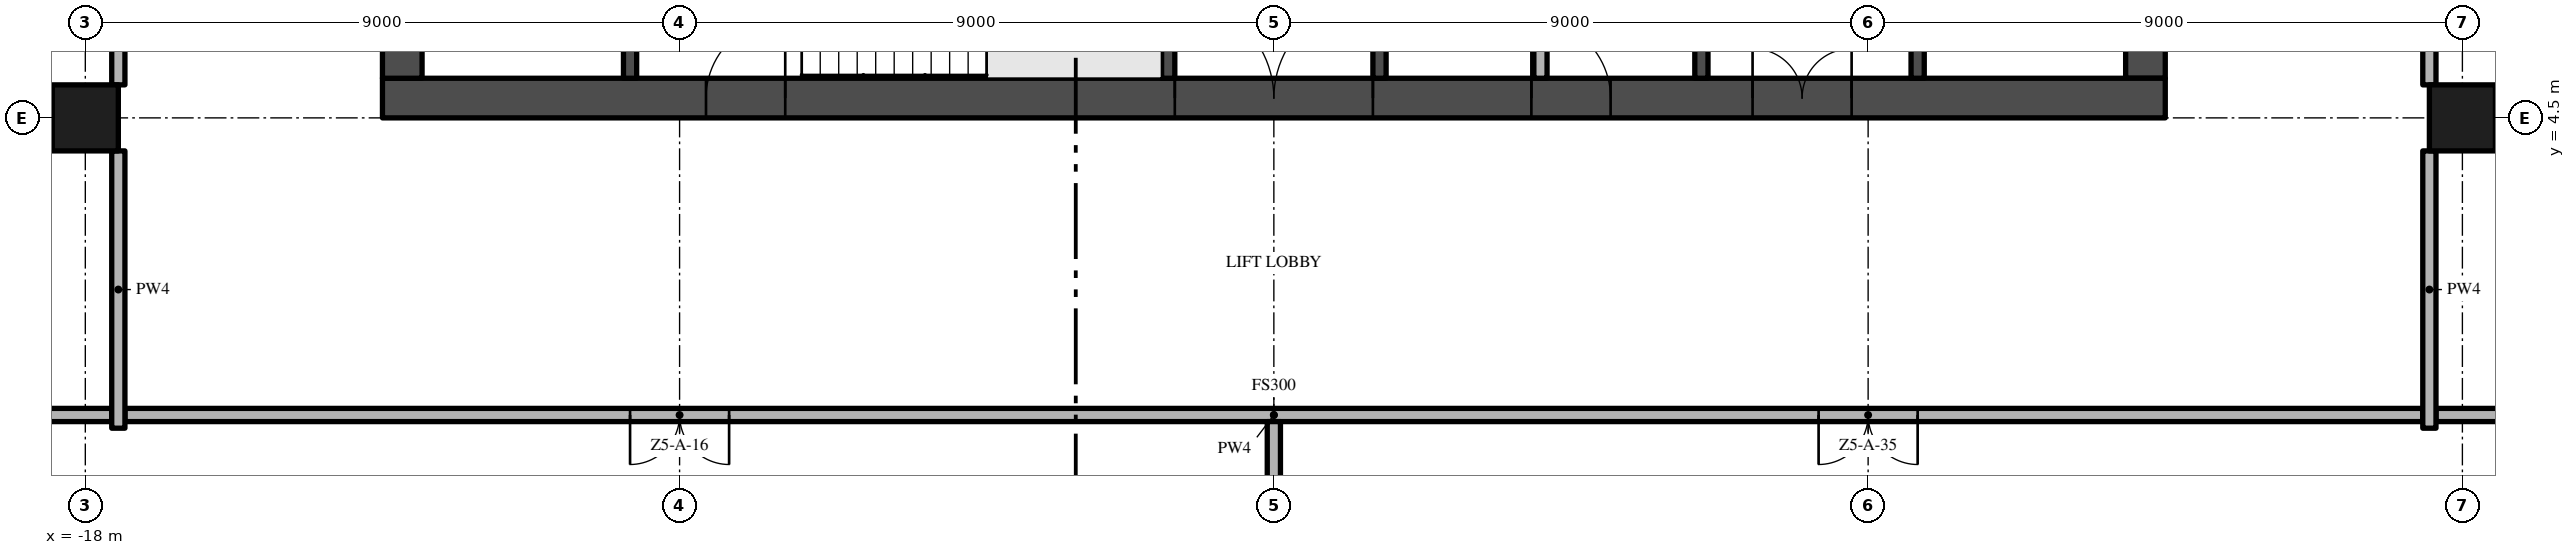
"""IFC4 building model, lengths in metres.
Left out: names, types, materials, properties, quantities, classifications, styles, units other than length and angle.
Written with IfcOpenShell. Run it as: python <this file> out.ifc"""

import sys

from ifc_helpers import new_model, si_unit, direction, frame, frame_2d, origin, origin_2d, place, context, subcontext, project, spatial, rectangle, extrude, element, fill, save


model = new_model("IFC4")
c1 = context("Model", 3, precision=1e-05, world=origin(), true_north=direction((0.0, 1.0)))
c2 = subcontext(c1, "Body", "Model", "MODEL_VIEW")
j1 = project(units=[si_unit("LENGTHUNIT", "METRE"), si_unit("PLANEANGLEUNIT", "RADIAN")], contexts=[c1])
p1 = place(None, origin())
s1 = spatial("IfcSite", under=j1, at=p1, CompositionType="ELEMENT")
p2 = place(p1, origin())
s2 = spatial("IfcBuilding", under=s1, at=p2, CompositionType="ELEMENT")
p3 = place(p2, frame((0.0, 0.0, 246.4)))
s3 = spatial("IfcBuildingStorey", under=s2, at=p3, CompositionType="ELEMENT", Elevation=246.4)
p4 = place(p3, frame((-13.5, 4.8, -0.3), z_axis=(0.0, 0.0, 1.0), x_axis=(1.0, 0.0, 0.0)))
e1 = element("IfcWall", 1, at=p4, inside=s3, PredefinedType="SHEAR", context=c2, shape_type="SweptSolid", body=[
    extrude(rectangle(XDim=27.0, YDim=0.6, at=frame_2d((13.5, 0.0))), origin(), (0.0, 0.0, 1.0), 3.8),
])
p5 = place(p4, frame((12.0, 0.0, 0.3)))
e2 = element("IfcOpeningElement", 2, at=p5, cuts=e1, PredefinedType="OPENING", context=c2, shape_type="SweptSolid", body=[
    extrude(rectangle(XDim=3.0, YDim=2.4, at=frame_2d((1.5, 1.2))), frame((0.0, 0.31, 0.0), z_axis=(0.0, -1.0, 0.0), x_axis=(1.0, 0.0, 0.0)), (0.0, 0.0, 1.0), 0.62),
])
p6 = place(p4, frame((4.9, 0.0, 0.3)))
e3 = element("IfcOpeningElement", 3, at=p6, cuts=e1, PredefinedType="OPENING", context=c2, shape_type="SweptSolid", body=[
    extrude(rectangle(XDim=1.2, YDim=2.2, at=frame_2d((0.6, 1.1))), frame((0.0, 0.31, 0.0), z_axis=(0.0, -1.0, 0.0), x_axis=(1.0, 0.0, 0.0)), (0.0, 0.0, 1.0), 0.62),
])
p7 = place(p4, frame((20.75, 0.0, 0.3)))
e4 = element("IfcOpeningElement", 4, at=p7, cuts=e1, PredefinedType="OPENING", context=c2, shape_type="SweptSolid", body=[
    extrude(rectangle(XDim=1.5, YDim=2.2, at=frame_2d((0.75, 1.1))), frame((0.0, 0.31, 0.0), z_axis=(0.0, -1.0, 0.0), x_axis=(1.0, 0.0, 0.0)), (0.0, 0.0, 1.0), 0.62),
])
p8 = place(p4, frame((17.4, 0.0, 0.3)))
e5 = element("IfcOpeningElement", 5, at=p8, cuts=e1, PredefinedType="OPENING", context=c2, shape_type="SweptSolid", body=[
    extrude(rectangle(XDim=1.2, YDim=2.2, at=frame_2d((0.6, 1.1))), frame((0.0, 0.31, 0.0), z_axis=(0.0, -1.0, 0.0), x_axis=(1.0, 0.0, 0.0)), (0.0, 0.0, 1.0), 0.62),
])
p9 = place(p3, frame((13.2, 5.1, -0.3), z_axis=(0.0, 0.0, 1.0), x_axis=(0.0, 1.0, 0.0)))
e6 = element("IfcWall", 6, at=p9, inside=s3, PredefinedType="SHEAR", context=c2, shape_type="SweptSolid", body=[
    extrude(rectangle(XDim=16.8, YDim=0.6, at=frame_2d((8.4, 0.0))), origin(), (0.0, 0.0, 1.0), 3.8),
])
p10 = place(p9, frame((6.3, 0.0, 0.3)))
e7 = element("IfcOpeningElement", 7, at=p10, cuts=e6, PredefinedType="OPENING", context=c2, shape_type="SweptSolid", body=[
    extrude(rectangle(XDim=1.2, YDim=2.2, at=frame_2d((0.6, 1.1))), frame((0.0, 0.31, 0.0), z_axis=(0.0, -1.0, 0.0), x_axis=(1.0, 0.0, 0.0)), (0.0, 0.0, 1.0), 0.62),
])
p11 = place(p3, frame((-13.2, 21.9, -0.3), z_axis=(0.0, 0.0, 1.0), x_axis=(0.0, -1.0, 0.0)))
e8 = element("IfcWall", 8, at=p11, inside=s3, PredefinedType="SHEAR", context=c2, shape_type="SweptSolid", body=[
    extrude(rectangle(XDim=16.8, YDim=0.6, at=frame_2d((8.4, 0.0))), origin(), (0.0, 0.0, 1.0), 3.8),
])
p12 = place(p11, frame((9.3, 0.0, 0.3)))
e9 = element("IfcOpeningElement", 9, at=p12, cuts=e8, PredefinedType="OPENING", context=c2, shape_type="SweptSolid", body=[
    extrude(rectangle(XDim=1.2, YDim=2.2, at=frame_2d((0.6, 1.1))), frame((0.0, 0.31, 0.0), z_axis=(0.0, -1.0, 0.0), x_axis=(1.0, 0.0, 0.0)), (0.0, 0.0, 1.0), 0.62),
])
for number, where, z_axis, x_axis in (
    (10, (-18.0, 4.5, 0.0), (0.0, 0.0, 1.0), (1.0, 0.0, 0.0)),
    (11, (18.0, 4.5, 0.0), (0.0, 0.0, 1.0), (1.0, 0.0, 0.0)),
):
    element("IfcColumn", number, at=place(p3, frame(where, z_axis=z_axis, x_axis=x_axis)), inside=s3, PredefinedType="COLUMN", context=c2, shape_type="SweptSolid", body=[
        extrude(rectangle(XDim=1.0, YDim=1.0, at=origin_2d()), origin(), (0.0, 0.0, 1.0), 3.5),
    ])
for number, where, z_axis, x_axis in (
    (12, (-9.75, 5.1, 0.0), (0.0, 0.0, 1.0), (0.0, 1.0, 0.0)),
    (13, (-1.6, 5.1, 0.0), (0.0, 0.0, 1.0), (0.0, 1.0, 0.0)),
):
    element("IfcWall", number, at=place(p3, frame(where, z_axis=z_axis, x_axis=x_axis)), inside=s3, PredefinedType="SHEAR", context=c2, shape_type="SweptSolid", body=[
        extrude(rectangle(XDim=2.85, YDim=0.2, at=frame_2d((1.425, 0.0))), origin(), (0.0, 0.0, 1.0), 3.5),
    ])
p13 = place(p3, frame((1.6, 9.8, 0.0), z_axis=(0.0, 0.0, 1.0), x_axis=(0.0, -1.0, 0.0)))
e14 = element("IfcWall", 14, at=p13, inside=s3, PredefinedType="SHEAR", context=c2, shape_type="SweptSolid", body=[
    extrude(rectangle(XDim=4.7, YDim=0.2, at=frame_2d((2.35, 0.0))), origin(), (0.0, 0.0, 1.0), 3.5),
])
p14 = place(p13, frame((1.5, 0.0, 0.0)))
e15 = element("IfcOpeningElement", 15, at=p14, cuts=e14, PredefinedType="OPENING", context=c2, shape_type="SweptSolid", body=[
    extrude(rectangle(XDim=0.9, YDim=2.1, at=frame_2d((0.45, 1.05))), frame((0.0, 0.11, 0.0), z_axis=(0.0, -1.0, 0.0), x_axis=(1.0, 0.0, 0.0)), (0.0, 0.0, 1.0), 0.22),
])
p15 = place(p3, frame((4.037, 9.8, 0.0), z_axis=(0.0, 0.0, 1.0), x_axis=(0.0, -1.0, 0.0)))
e16 = element("IfcWall", 16, at=p15, inside=s3, PredefinedType="PARTITIONING", context=c2, shape_type="SweptSolid", body=[
    extrude(rectangle(XDim=4.7, YDim=0.2, at=frame_2d((2.35, 0.0))), origin(), (0.0, 0.0, 1.0), 3.5),
])
p16 = place(p15, frame((1.9, 0.0, 0.0)))
e17 = element("IfcOpeningElement", 17, at=p16, cuts=e16, PredefinedType="OPENING", context=c2, shape_type="SweptSolid", body=[
    extrude(rectangle(XDim=0.9, YDim=2.1, at=frame_2d((0.45, 1.05))), frame((0.0, 0.11, 0.0), z_axis=(0.0, -1.0, 0.0), x_axis=(1.0, 0.0, 0.0)), (0.0, 0.0, 1.0), 0.22),
])
p17 = place(p3, frame((6.475, 5.1, 0.0), z_axis=(0.0, 0.0, 1.0), x_axis=(0.0, 1.0, 0.0)))
e18 = element("IfcWall", 18, at=p17, inside=s3, PredefinedType="SHEAR", context=c2, shape_type="SweptSolid", body=[
    extrude(rectangle(XDim=4.7, YDim=0.2, at=frame_2d((2.35, 0.0))), origin(), (0.0, 0.0, 1.0), 3.5),
])
p18 = place(p3, frame((9.75, 5.1, 0.0), z_axis=(0.0, 0.0, 1.0), x_axis=(0.0, 1.0, 0.0)))
e19 = element("IfcWall", 19, at=p18, inside=s3, PredefinedType="SHEAR", context=c2, shape_type="SweptSolid", body=[
    extrude(rectangle(XDim=2.5, YDim=0.2, at=frame_2d((1.25, 0.0))), origin(), (0.0, 0.0, 1.0), 3.5),
])
p19 = place(p18, frame((0.85, 0.0, 0.0)))
e20 = element("IfcOpeningElement", 20, at=p19, cuts=e19, PredefinedType="OPENING", context=c2, shape_type="SweptSolid", body=[
    extrude(rectangle(XDim=1.1, YDim=2.1, at=frame_2d((0.55, 1.05))), frame((0.0, 0.11, 0.0), z_axis=(0.0, -1.0, 0.0), x_axis=(1.0, 0.0, 0.0)), (0.0, 0.0, 1.0), 0.22),
])
p20 = place(p3, frame((17.4, 0.0, 0.0), z_axis=(0.0, 0.0, 1.0), x_axis=(-1.0, 0.0, 0.0)))
e21 = element("IfcWall", 21, at=p20, inside=s3, PredefinedType="PARTITIONING", context=c2, shape_type="SweptSolid", body=[
    extrude(rectangle(XDim=34.8, YDim=0.2, at=frame_2d((17.4, 0.0))), origin(), (0.0, 0.0, 1.0), 3.5),
])
p21 = place(p20, frame((25.65, 0.0, 0.0)))
e22 = element("IfcOpeningElement", 22, at=p21, cuts=e21, PredefinedType="OPENING", context=c2, shape_type="SweptSolid", body=[
    extrude(rectangle(XDim=1.5, YDim=2.4, at=frame_2d((0.75, 1.2))), frame((0.0, 0.11, 0.0), z_axis=(0.0, -1.0, 0.0), x_axis=(1.0, 0.0, 0.0)), (0.0, 0.0, 1.0), 0.22),
])
p22 = place(p20, frame((7.65, 0.0, 0.0)))
e23 = element("IfcOpeningElement", 23, at=p22, cuts=e21, PredefinedType="OPENING", context=c2, shape_type="SweptSolid", body=[
    extrude(rectangle(XDim=1.5, YDim=2.4, at=frame_2d((0.75, 1.2))), frame((0.0, 0.11, 0.0), z_axis=(0.0, -1.0, 0.0), x_axis=(1.0, 0.0, 0.0)), (0.0, 0.0, 1.0), 0.22),
])
for number, where, z_axis, x_axis in (
    (24, (-26.7, 0.0, 0.0), (0.0, 0.0, 1.0), (1.0, 0.0, 0.0)),
    (25, (17.6, 0.0, 0.0), (0.0, 0.0, 1.0), (1.0, 0.0, 0.0)),
):
    element("IfcWall", number, at=place(p3, frame(where, z_axis=z_axis, x_axis=x_axis)), inside=s3, PredefinedType="PARTITIONING", context=c2, shape_type="SweptSolid", body=[
        extrude(rectangle(XDim=9.1, YDim=0.2, at=frame_2d((4.55, 0.0))), origin(), (0.0, 0.0, 1.0), 3.5),
    ])
p23 = place(p3, frame((-17.5, -0.2, 0.0), z_axis=(0.0, 0.0, 1.0), x_axis=(0.0, 1.0, 0.0)))
e26 = element("IfcWall", 26, at=p23, inside=s3, PredefinedType="PARTITIONING", context=c2, shape_type="SweptSolid", body=[
    extrude(rectangle(XDim=4.2, YDim=0.2, at=frame_2d((2.1, 0.0))), origin(), (0.0, 0.0, 1.0), 3.5),
])
p24 = place(p3, frame((-17.5, 5.0, 0.0), z_axis=(0.0, 0.0, 1.0), x_axis=(0.0, 1.0, 0.0)))
e27 = element("IfcWall", 27, at=p24, inside=s3, PredefinedType="PARTITIONING", context=c2, shape_type="SweptSolid", body=[
    extrude(rectangle(XDim=8.0, YDim=0.2, at=frame_2d((4.0, 0.0))), origin(), (0.0, 0.0, 1.0), 3.5),
])
p25 = place(p3, frame((0.0, -4.0, 0.0), z_axis=(0.0, 0.0, 1.0), x_axis=(0.0, 1.0, 0.0)))
e28 = element("IfcWall", 28, at=p25, inside=s3, PredefinedType="PARTITIONING", context=c2, shape_type="SweptSolid", body=[
    extrude(rectangle(XDim=3.9, YDim=0.2, at=frame_2d((1.95, 0.0))), origin(), (0.0, 0.0, 1.0), 3.5),
])
p26 = place(p3, frame((17.5, -0.2, 0.0), z_axis=(0.0, 0.0, 1.0), x_axis=(0.0, 1.0, 0.0)))
e29 = element("IfcWall", 29, at=p26, inside=s3, PredefinedType="PARTITIONING", context=c2, shape_type="SweptSolid", body=[
    extrude(rectangle(XDim=4.2, YDim=0.2, at=frame_2d((2.1, 0.0))), origin(), (0.0, 0.0, 1.0), 3.5),
])
p27 = place(p3, frame((17.5, 5.0, 0.0), z_axis=(0.0, 0.0, 1.0), x_axis=(0.0, 1.0, 0.0)))
e30 = element("IfcWall", 30, at=p27, inside=s3, PredefinedType="PARTITIONING", context=c2, shape_type="SweptSolid", body=[
    extrude(rectangle(XDim=8.0, YDim=0.2, at=frame_2d((4.0, 0.0))), origin(), (0.0, 0.0, 1.0), 3.5),
])
p28 = place(p5, frame((3.0, 0.0, 0.0), z_axis=(0.0, 0.0, 1.0), x_axis=(-1.0, 0.0, 0.0)))
e31 = element("IfcDoor", 31, at=p28, inside=s3, OperationType="DOUBLE_DOOR_SINGLE_SWING", PredefinedType="DOOR", context=c2, shape_type="SweptSolid", body=[
    extrude(rectangle(XDim=3.0, YDim=2.4, at=frame_2d((1.5, 1.2))), frame((0.0, 0.025, 0.0), z_axis=(0.0, -1.0, 0.0), x_axis=(1.0, 0.0, 0.0)), (0.0, 0.0, 1.0), 0.05),
])
fill(e2, e31)
p29 = place(p6, frame((1.2, 0.0, 0.0), z_axis=(0.0, 0.0, 1.0), x_axis=(-1.0, 0.0, 0.0)))
e32 = element("IfcDoor", 32, at=p29, inside=s3, OperationType="SINGLE_SWING_LEFT", PredefinedType="DOOR", context=c2, shape_type="SweptSolid", body=[
    extrude(rectangle(XDim=1.2, YDim=2.2, at=frame_2d((0.6, 1.1))), frame((0.0, 0.025, 0.0), z_axis=(0.0, -1.0, 0.0), x_axis=(1.0, 0.0, 0.0)), (0.0, 0.0, 1.0), 0.05),
])
fill(e3, e32)
p30 = place(p7, frame((1.5, 0.0, 0.0), z_axis=(0.0, 0.0, 1.0), x_axis=(-1.0, 0.0, 0.0)))
e33 = element("IfcDoor", 33, at=p30, inside=s3, OperationType="DOUBLE_DOOR_SINGLE_SWING", PredefinedType="DOOR", context=c2, shape_type="SweptSolid", body=[
    extrude(rectangle(XDim=1.5, YDim=2.2, at=frame_2d((0.75, 1.1))), frame((0.0, 0.025, 0.0), z_axis=(0.0, -1.0, 0.0), x_axis=(1.0, 0.0, 0.0)), (0.0, 0.0, 1.0), 0.05),
])
fill(e4, e33)
p31 = place(p8, frame((1.2, 0.0, 0.0), z_axis=(0.0, 0.0, 1.0), x_axis=(-1.0, 0.0, 0.0)))
e34 = element("IfcDoor", 34, at=p31, inside=s3, OperationType="SINGLE_SWING_RIGHT", PredefinedType="DOOR", context=c2, shape_type="SweptSolid", body=[
    extrude(rectangle(XDim=1.2, YDim=2.2, at=frame_2d((0.6, 1.1))), frame((0.0, 0.025, 0.0), z_axis=(0.0, -1.0, 0.0), x_axis=(1.0, 0.0, 0.0)), (0.0, 0.0, 1.0), 0.05),
])
fill(e5, e34)
p32 = place(p21, origin())
e35 = element("IfcDoor", 35, at=p32, inside=s3, OperationType="DOUBLE_DOOR_SINGLE_SWING", PredefinedType="DOOR", context=c2, shape_type="SweptSolid", body=[
    extrude(rectangle(XDim=1.5, YDim=2.4, at=frame_2d((0.75, 1.2))), frame((0.0, 0.025, 0.0), z_axis=(0.0, -1.0, 0.0), x_axis=(1.0, 0.0, 0.0)), (0.0, 0.0, 1.0), 0.05),
])
fill(e22, e35)
p33 = place(p22, origin())
e36 = element("IfcDoor", 36, at=p33, inside=s3, OperationType="DOUBLE_DOOR_SINGLE_SWING", PredefinedType="DOOR", context=c2, shape_type="SweptSolid", body=[
    extrude(rectangle(XDim=1.5, YDim=2.4, at=frame_2d((0.75, 1.2))), frame((0.0, 0.025, 0.0), z_axis=(0.0, -1.0, 0.0), x_axis=(1.0, 0.0, 0.0)), (0.0, 0.0, 1.0), 0.05),
])
fill(e23, e36)
save(model, sys.argv[1])
